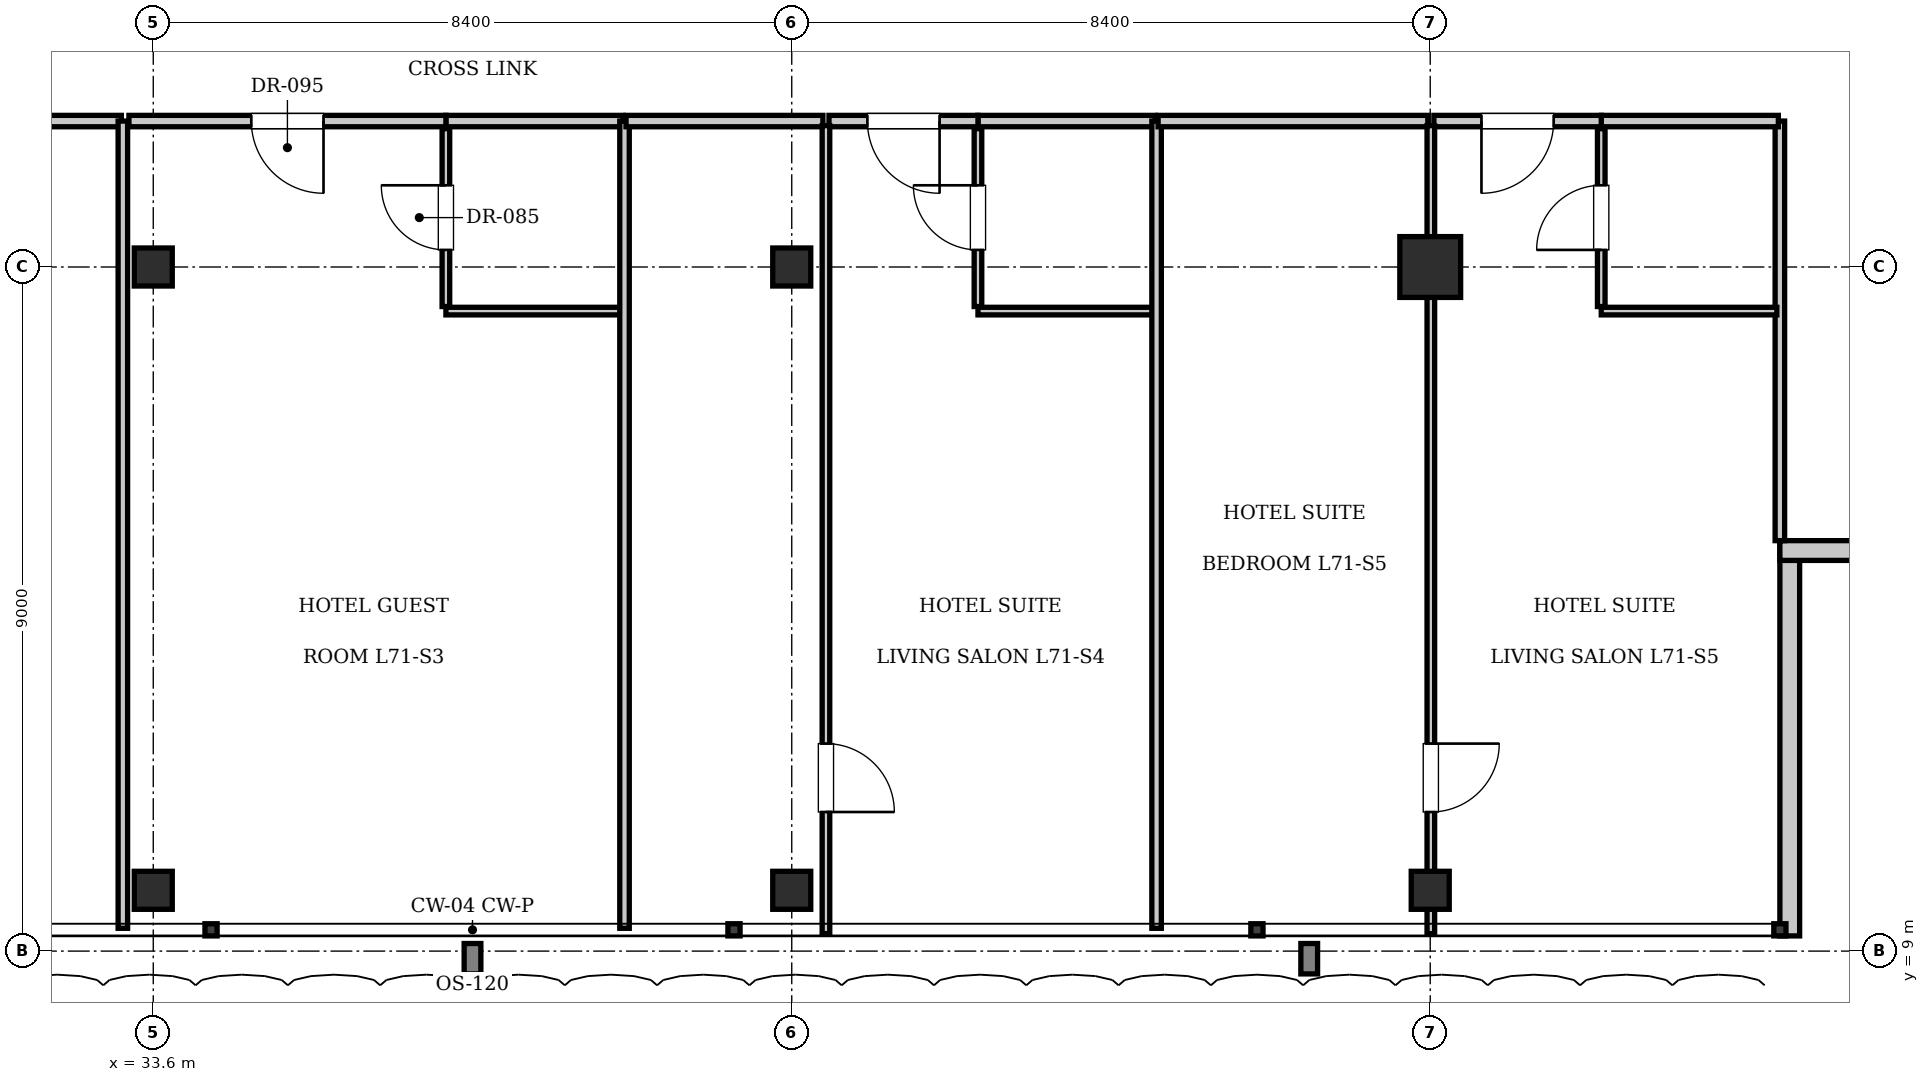
"""IFC4 building model, lengths in metres.
Left out: names, types, materials, properties, quantities, classifications, styles, units other than length and angle.
Written with IfcOpenShell. Run it as: python <this file> out.ifc"""

import sys

from ifc_helpers import new_model, si_unit, direction, frame, frame_2d, origin, origin_2d, place, context, subcontext, project, spatial, rectangle, i_section, extrude, element, fill, save


model = new_model("IFC4")
c1 = context("Model", 3, precision=1e-05, world=origin(), true_north=direction((0.0, 1.0)))
c2 = subcontext(c1, "Body", "Model", "MODEL_VIEW")
j1 = project(units=[si_unit("LENGTHUNIT", "METRE"), si_unit("PLANEANGLEUNIT", "RADIAN")], contexts=[c1])
p1 = place(None, origin())
s1 = spatial("IfcSite", under=j1, at=p1, CompositionType="ELEMENT")
p2 = place(p1, origin())
s2 = spatial("IfcBuilding", under=s1, at=p2, CompositionType="ELEMENT")
p3 = place(p2, frame((0.0, 0.0, 289.45)))
s3 = spatial("IfcBuildingStorey", under=s2, at=p3, CompositionType="ELEMENT", Elevation=289.45)
p4 = place(p3, frame((50.4, 18.0, 0.0), z_axis=(0.0, 0.0, 1.0), x_axis=(1.0, 0.0, 0.0)))
e1 = element("IfcColumn", 1, at=p4, inside=s3, PredefinedType="COLUMN", context=c2, shape_type="SweptSolid", body=[
    extrude(rectangle(XDim=0.8, YDim=0.8, at=origin_2d()), origin(), (0.0, 0.0, 1.0), 3.85),
])
for number, where, z_axis, x_axis in (
    (2, (33.6, 18.0, 0.0), (0.0, 0.0, 1.0), (1.0, 0.0, 0.0)),
    (3, (42.0, 18.0, 0.0), (0.0, 0.0, 1.0), (1.0, 0.0, 0.0)),
    (4, (33.6, 9.8, 0.0), (0.0, 0.0, 1.0), (1.0, 0.0, 0.0)),
    (5, (42.0, 9.8, 0.0), (0.0, 0.0, 1.0), (1.0, 0.0, 0.0)),
    (6, (50.4, 9.8, 0.0), (0.0, 0.0, 1.0), (1.0, 0.0, 0.0)),
):
    element("IfcColumn", number, at=place(p3, frame(where, z_axis=z_axis, x_axis=x_axis)), inside=s3, PredefinedType="COLUMN", context=c2, shape_type="SweptSolid", body=[
        extrude(i_section(OverallWidth=0.5, OverallDepth=0.5, WebThickness=0.022, FlangeThickness=0.032, at=origin_2d()), origin(), (0.0, 0.0, 1.0), 3.85),
    ])
p5 = place(p3, frame((55.13, 14.4, 0.0), z_axis=(0.0, 0.0, 1.0), x_axis=(0.0, -1.0, 0.0)))
e7 = element("IfcWall", 7, at=p5, inside=s3, PredefinedType="SOLIDWALL", context=c2, shape_type="SweptSolid", body=[
    extrude(rectangle(XDim=5.2, YDim=0.26, at=frame_2d((2.6, 0.0))), origin(), (0.0, 0.0, 1.0), 3.61),
])
p6 = place(p3, frame((60.2, 14.27, 0.0), z_axis=(0.0, 0.0, 1.0), x_axis=(-1.0, 0.0, 0.0)))
e8 = element("IfcWall", 8, at=p6, inside=s3, PredefinedType="SOLIDWALL", context=c2, shape_type="SweptSolid", body=[
    extrude(rectangle(XDim=5.2, YDim=0.26, at=frame_2d((2.6, 0.0))), origin(), (0.0, 0.0, 1.0), 3.61),
])
p7 = place(p6, frame((1.6, 0.0, 0.9)))
e9 = element("IfcOpeningElement", 9, at=p7, cuts=e8, PredefinedType="OPENING", context=c2, shape_type="SweptSolid", body=[
    extrude(rectangle(XDim=2.0, YDim=2.2, at=frame_2d((1.0, 1.1))), frame((0.0, 0.14, 0.0), z_axis=(0.0, -1.0, 0.0), x_axis=(1.0, 0.0, 0.0)), (0.0, 0.0, 1.0), 0.28),
])
p8 = place(p3, frame((55.0, 14.4, 0.0), z_axis=(0.0, 0.0, 1.0), x_axis=(0.0, 1.0, 0.0)))
e10 = element("IfcWall", 10, at=p8, inside=s3, PredefinedType="PARTITIONING", context=c2, shape_type="SweptSolid", body=[
    extrude(rectangle(XDim=5.52, YDim=0.125, at=frame_2d((2.76, 0.0))), origin(), (0.0, 0.0, 1.0), 3.61),
])
p9 = place(p3, frame((29.1, 19.92, 0.0), z_axis=(0.0, 0.0, 1.0), x_axis=(1.0, 0.0, 0.0)))
e11 = element("IfcWall", 11, at=p9, inside=s3, PredefinedType="PARTITIONING", context=c2, shape_type="SweptSolid", body=[
    extrude(rectangle(XDim=4.08, YDim=0.15, at=frame_2d((2.04, 0.0))), origin(), (0.0, 0.0, 1.0), 3.61),
])
p10 = place(p9, frame((1.565, 0.0, 0.0)))
e12 = element("IfcOpeningElement", 12, at=p10, cuts=e11, PredefinedType="OPENING", context=c2, shape_type="SweptSolid", body=[
    extrude(rectangle(XDim=0.95, YDim=2.15, at=frame_2d((0.475, 1.075))), frame((0.0, 0.085, 0.0), z_axis=(0.0, -1.0, 0.0), x_axis=(1.0, 0.0, 0.0)), (0.0, 0.0, 1.0), 0.17),
])
p11 = place(p3, frame((33.2, 9.3, 0.0), z_axis=(0.0, 0.0, 1.0), x_axis=(0.0, 1.0, 0.0)))
e13 = element("IfcWall", 13, at=p11, inside=s3, PredefinedType="PARTITIONING", context=c2, shape_type="SweptSolid", body=[
    extrude(rectangle(XDim=10.62, YDim=0.125, at=frame_2d((5.31, 0.0))), origin(), (0.0, 0.0, 1.0), 3.61),
])
p12 = place(p3, frame((37.45, 19.92, 0.0), z_axis=(0.0, 0.0, 1.0), x_axis=(1.0, 0.0, 0.0)))
e14 = element("IfcWall", 14, at=p12, inside=s3, PredefinedType="PARTITIONING", context=c2, shape_type="SweptSolid", body=[
    extrude(rectangle(XDim=2.33, YDim=0.15, at=frame_2d((1.165, 0.0))), origin(), (0.0, 0.0, 1.0), 3.61),
])
p13 = place(p3, frame((37.45, 17.42, 0.0), z_axis=(0.0, 0.0, 1.0), x_axis=(1.0, 0.0, 0.0)))
e15 = element("IfcWall", 15, at=p13, inside=s3, PredefinedType="PARTITIONING", context=c2, shape_type="SweptSolid", body=[
    extrude(rectangle(XDim=2.31, YDim=0.1, at=frame_2d((1.155, 0.0))), origin(), (0.0, 0.0, 1.0), 3.61),
])
p14 = place(p3, frame((37.45, 17.48, 0.0), z_axis=(0.0, 0.0, 1.0), x_axis=(0.0, 1.0, 0.0)))
e16 = element("IfcWall", 16, at=p14, inside=s3, PredefinedType="PARTITIONING", context=c2, shape_type="SweptSolid", body=[
    extrude(rectangle(XDim=2.34, YDim=0.1, at=frame_2d((1.17, 0.0))), origin(), (0.0, 0.0, 1.0), 3.61),
])
p15 = place(p14, frame((0.745, 0.0, 0.0)))
e17 = element("IfcOpeningElement", 17, at=p15, cuts=e16, PredefinedType="OPENING", context=c2, shape_type="SweptSolid", body=[
    extrude(rectangle(XDim=0.85, YDim=2.1, at=frame_2d((0.425, 1.05))), frame((0.0, 0.06, 0.0), z_axis=(0.0, -1.0, 0.0), x_axis=(1.0, 0.0, 0.0)), (0.0, 0.0, 1.0), 0.12),
])
p16 = place(p3, frame((33.28, 19.92, 0.0), z_axis=(0.0, 0.0, 1.0), x_axis=(1.0, 0.0, 0.0)))
e18 = element("IfcWall", 18, at=p16, inside=s3, PredefinedType="PARTITIONING", context=c2, shape_type="SweptSolid", body=[
    extrude(rectangle(XDim=4.17, YDim=0.15, at=frame_2d((2.085, 0.0))), origin(), (0.0, 0.0, 1.0), 3.61),
])
p17 = place(p16, frame((1.61, 0.0, 0.0)))
e19 = element("IfcOpeningElement", 19, at=p17, cuts=e18, PredefinedType="OPENING", context=c2, shape_type="SweptSolid", body=[
    extrude(rectangle(XDim=0.95, YDim=2.15, at=frame_2d((0.475, 1.075))), frame((0.0, 0.085, 0.0), z_axis=(0.0, -1.0, 0.0), x_axis=(1.0, 0.0, 0.0)), (0.0, 0.0, 1.0), 0.17),
])
p18 = place(p3, frame((39.8, 9.3, 0.0), z_axis=(0.0, 0.0, 1.0), x_axis=(0.0, 1.0, 0.0)))
e20 = element("IfcWall", 20, at=p18, inside=s3, PredefinedType="PARTITIONING", context=c2, shape_type="SweptSolid", body=[
    extrude(rectangle(XDim=10.62, YDim=0.125, at=frame_2d((5.31, 0.0))), origin(), (0.0, 0.0, 1.0), 3.61),
])
p19 = place(p3, frame((44.45, 19.92, 0.0), z_axis=(0.0, 0.0, 1.0), x_axis=(1.0, 0.0, 0.0)))
e21 = element("IfcWall", 21, at=p19, inside=s3, PredefinedType="PARTITIONING", context=c2, shape_type="SweptSolid", body=[
    extrude(rectangle(XDim=2.33, YDim=0.15, at=frame_2d((1.165, 0.0))), origin(), (0.0, 0.0, 1.0), 3.61),
])
p20 = place(p3, frame((44.45, 17.42, 0.0), z_axis=(0.0, 0.0, 1.0), x_axis=(1.0, 0.0, 0.0)))
e22 = element("IfcWall", 22, at=p20, inside=s3, PredefinedType="PARTITIONING", context=c2, shape_type="SweptSolid", body=[
    extrude(rectangle(XDim=2.31, YDim=0.1, at=frame_2d((1.155, 0.0))), origin(), (0.0, 0.0, 1.0), 3.61),
])
p21 = place(p3, frame((44.45, 17.48, 0.0), z_axis=(0.0, 0.0, 1.0), x_axis=(0.0, 1.0, 0.0)))
e23 = element("IfcWall", 23, at=p21, inside=s3, PredefinedType="PARTITIONING", context=c2, shape_type="SweptSolid", body=[
    extrude(rectangle(XDim=2.34, YDim=0.1, at=frame_2d((1.17, 0.0))), origin(), (0.0, 0.0, 1.0), 3.61),
])
p22 = place(p21, frame((0.745, 0.0, 0.0)))
e24 = element("IfcOpeningElement", 24, at=p22, cuts=e23, PredefinedType="OPENING", context=c2, shape_type="SweptSolid", body=[
    extrude(rectangle(XDim=0.85, YDim=2.1, at=frame_2d((0.425, 1.05))), frame((0.0, 0.06, 0.0), z_axis=(0.0, -1.0, 0.0), x_axis=(1.0, 0.0, 0.0)), (0.0, 0.0, 1.0), 0.12),
])
p23 = place(p3, frame((39.82, 19.92, 0.0), z_axis=(0.0, 0.0, 1.0), x_axis=(1.0, 0.0, 0.0)))
e25 = element("IfcWall", 25, at=p23, inside=s3, PredefinedType="PARTITIONING", context=c2, shape_type="SweptSolid", body=[
    extrude(rectangle(XDim=2.59, YDim=0.15, at=frame_2d((1.295, 0.0))), origin(), (0.0, 0.0, 1.0), 3.61),
])
p24 = place(p3, frame((42.49, 19.92, 0.0), z_axis=(0.0, 0.0, 1.0), x_axis=(1.0, 0.0, 0.0)))
e26 = element("IfcWall", 26, at=p24, inside=s3, PredefinedType="PARTITIONING", context=c2, shape_type="SweptSolid", body=[
    extrude(rectangle(XDim=1.96, YDim=0.15, at=frame_2d((0.98, 0.0))), origin(), (0.0, 0.0, 1.0), 3.61),
])
p25 = place(p24, frame((0.505, 0.0, 0.0)))
e27 = element("IfcOpeningElement", 27, at=p25, cuts=e26, PredefinedType="OPENING", context=c2, shape_type="SweptSolid", body=[
    extrude(rectangle(XDim=0.95, YDim=2.15, at=frame_2d((0.475, 1.075))), frame((0.0, 0.085, 0.0), z_axis=(0.0, -1.0, 0.0), x_axis=(1.0, 0.0, 0.0)), (0.0, 0.0, 1.0), 0.17),
])
p26 = place(p3, frame((42.45, 9.23, 0.0), z_axis=(0.0, 0.0, 1.0), x_axis=(0.0, 1.0, 0.0)))
e28 = element("IfcWall", 28, at=p26, inside=s3, PredefinedType="PARTITIONING", context=c2, shape_type="SweptSolid", body=[
    extrude(rectangle(XDim=10.63, YDim=0.1, at=frame_2d((5.315, 0.0))), origin(), (0.0, 0.0, 1.0), 3.61),
])
p27 = place(p26, frame((1.6, 0.0, 0.0)))
e29 = element("IfcOpeningElement", 29, at=p27, cuts=e28, PredefinedType="OPENING", context=c2, shape_type="SweptSolid", body=[
    extrude(rectangle(XDim=0.9, YDim=2.1, at=frame_2d((0.45, 1.05))), frame((0.0, 0.06, 0.0), z_axis=(0.0, -1.0, 0.0), x_axis=(1.0, 0.0, 0.0)), (0.0, 0.0, 1.0), 0.12),
])
p28 = place(p3, frame((46.8, 9.3, 0.0), z_axis=(0.0, 0.0, 1.0), x_axis=(0.0, 1.0, 0.0)))
e30 = element("IfcWall", 30, at=p28, inside=s3, PredefinedType="PARTITIONING", context=c2, shape_type="SweptSolid", body=[
    extrude(rectangle(XDim=10.62, YDim=0.125, at=frame_2d((5.31, 0.0))), origin(), (0.0, 0.0, 1.0), 3.61),
])
p29 = place(p3, frame((52.65, 19.92, 0.0), z_axis=(0.0, 0.0, 1.0), x_axis=(1.0, 0.0, 0.0)))
e31 = element("IfcWall", 31, at=p29, inside=s3, PredefinedType="PARTITIONING", context=c2, shape_type="SweptSolid", body=[
    extrude(rectangle(XDim=2.33, YDim=0.15, at=frame_2d((1.165, 0.0))), origin(), (0.0, 0.0, 1.0), 3.61),
])
p30 = place(p3, frame((52.65, 17.42, 0.0), z_axis=(0.0, 0.0, 1.0), x_axis=(1.0, 0.0, 0.0)))
e32 = element("IfcWall", 32, at=p30, inside=s3, PredefinedType="PARTITIONING", context=c2, shape_type="SweptSolid", body=[
    extrude(rectangle(XDim=2.31, YDim=0.1, at=frame_2d((1.155, 0.0))), origin(), (0.0, 0.0, 1.0), 3.61),
])
p31 = place(p3, frame((52.65, 17.48, 0.0), z_axis=(0.0, 0.0, 1.0), x_axis=(0.0, 1.0, 0.0)))
e33 = element("IfcWall", 33, at=p31, inside=s3, PredefinedType="PARTITIONING", context=c2, shape_type="SweptSolid", body=[
    extrude(rectangle(XDim=2.34, YDim=0.1, at=frame_2d((1.17, 0.0))), origin(), (0.0, 0.0, 1.0), 3.61),
])
p32 = place(p31, frame((0.745, 0.0, 0.0)))
e34 = element("IfcOpeningElement", 34, at=p32, cuts=e33, PredefinedType="OPENING", context=c2, shape_type="SweptSolid", body=[
    extrude(rectangle(XDim=0.85, YDim=2.1, at=frame_2d((0.425, 1.05))), frame((0.0, 0.06, 0.0), z_axis=(0.0, -1.0, 0.0), x_axis=(1.0, 0.0, 0.0)), (0.0, 0.0, 1.0), 0.12),
])
p33 = place(p3, frame((46.82, 19.92, 0.0), z_axis=(0.0, 0.0, 1.0), x_axis=(1.0, 0.0, 0.0)))
e35 = element("IfcWall", 35, at=p33, inside=s3, PredefinedType="PARTITIONING", context=c2, shape_type="SweptSolid", body=[
    extrude(rectangle(XDim=3.548, YDim=0.15, at=frame_2d((1.774, 0.0))), origin(), (0.0, 0.0, 1.0), 3.61),
])
p34 = place(p3, frame((50.448, 19.92, 0.0), z_axis=(0.0, 0.0, 1.0), x_axis=(1.0, 0.0, 0.0)))
e36 = element("IfcWall", 36, at=p34, inside=s3, PredefinedType="PARTITIONING", context=c2, shape_type="SweptSolid", body=[
    extrude(rectangle(XDim=2.202, YDim=0.15, at=frame_2d((1.101, 0.0))), origin(), (0.0, 0.0, 1.0), 3.61),
])
p35 = place(p34, frame((0.626, 0.0, 0.0)))
e37 = element("IfcOpeningElement", 37, at=p35, cuts=e36, PredefinedType="OPENING", context=c2, shape_type="SweptSolid", body=[
    extrude(rectangle(XDim=0.95, YDim=2.15, at=frame_2d((0.475, 1.075))), frame((0.0, 0.085, 0.0), z_axis=(0.0, -1.0, 0.0), x_axis=(1.0, 0.0, 0.0)), (0.0, 0.0, 1.0), 0.17),
])
p36 = place(p3, frame((50.408, 9.23, 0.0), z_axis=(0.0, 0.0, 1.0), x_axis=(0.0, 1.0, 0.0)))
e38 = element("IfcWall", 38, at=p36, inside=s3, PredefinedType="PARTITIONING", context=c2, shape_type="SweptSolid", body=[
    extrude(rectangle(XDim=10.63, YDim=0.1, at=frame_2d((5.315, 0.0))), origin(), (0.0, 0.0, 1.0), 3.081),
])
p37 = place(p36, frame((1.6, 0.0, 0.0)))
e39 = element("IfcOpeningElement", 39, at=p37, cuts=e38, PredefinedType="OPENING", context=c2, shape_type="SweptSolid", body=[
    extrude(rectangle(XDim=0.9, YDim=2.1, at=frame_2d((0.45, 1.05))), frame((0.0, 0.06, 0.0), z_axis=(0.0, -1.0, 0.0), x_axis=(1.0, 0.0, 0.0)), (0.0, 0.0, 1.0), 0.12),
])
p38 = place(p15, origin())
e40 = element("IfcDoor", 40, at=p38, inside=s3, OperationType="SINGLE_SWING_RIGHT", PredefinedType="DOOR", context=c2, shape_type="SweptSolid", body=[
    extrude(rectangle(XDim=0.85, YDim=2.1, at=frame_2d((0.425, 1.05))), frame((0.0, 0.025, 0.0), z_axis=(0.0, -1.0, 0.0), x_axis=(1.0, 0.0, 0.0)), (0.0, 0.0, 1.0), 0.05),
])
fill(e17, e40)
p39 = place(p17, frame((0.95, 0.0, 0.0), z_axis=(0.0, 0.0, 1.0), x_axis=(-1.0, 0.0, 0.0)))
e41 = element("IfcDoor", 41, at=p39, inside=s3, OperationType="SINGLE_SWING_LEFT", PredefinedType="DOOR", context=c2, shape_type="SweptSolid", body=[
    extrude(rectangle(XDim=0.95, YDim=2.15, at=frame_2d((0.475, 1.075))), frame((0.0, 0.025, 0.0), z_axis=(0.0, -1.0, 0.0), x_axis=(1.0, 0.0, 0.0)), (0.0, 0.0, 1.0), 0.05),
])
fill(e19, e41)
p40 = place(p22, origin())
e42 = element("IfcDoor", 42, at=p40, inside=s3, OperationType="SINGLE_SWING_RIGHT", PredefinedType="DOOR", context=c2, shape_type="SweptSolid", body=[
    extrude(rectangle(XDim=0.85, YDim=2.1, at=frame_2d((0.425, 1.05))), frame((0.0, 0.025, 0.0), z_axis=(0.0, -1.0, 0.0), x_axis=(1.0, 0.0, 0.0)), (0.0, 0.0, 1.0), 0.05),
])
fill(e24, e42)
p41 = place(p25, frame((0.95, 0.0, 0.0), z_axis=(0.0, 0.0, 1.0), x_axis=(-1.0, 0.0, 0.0)))
e43 = element("IfcDoor", 43, at=p41, inside=s3, OperationType="SINGLE_SWING_LEFT", PredefinedType="DOOR", context=c2, shape_type="SweptSolid", body=[
    extrude(rectangle(XDim=0.95, YDim=2.15, at=frame_2d((0.475, 1.075))), frame((0.0, 0.025, 0.0), z_axis=(0.0, -1.0, 0.0), x_axis=(1.0, 0.0, 0.0)), (0.0, 0.0, 1.0), 0.05),
])
fill(e27, e43)
p42 = place(p27, frame((0.9, 0.0, 0.0), z_axis=(0.0, 0.0, 1.0), x_axis=(-1.0, 0.0, 0.0)))
e44 = element("IfcDoor", 44, at=p42, inside=s3, OperationType="SINGLE_SWING_RIGHT", PredefinedType="DOOR", context=c2, shape_type="SweptSolid", body=[
    extrude(rectangle(XDim=0.9, YDim=2.1, at=frame_2d((0.45, 1.05))), frame((0.0, 0.025, 0.0), z_axis=(0.0, -1.0, 0.0), x_axis=(1.0, 0.0, 0.0)), (0.0, 0.0, 1.0), 0.05),
])
fill(e29, e44)
p43 = place(p32, origin())
e45 = element("IfcDoor", 45, at=p43, inside=s3, OperationType="SINGLE_SWING_LEFT", PredefinedType="DOOR", context=c2, shape_type="SweptSolid", body=[
    extrude(rectangle(XDim=0.85, YDim=2.1, at=frame_2d((0.425, 1.05))), frame((0.0, 0.025, 0.0), z_axis=(0.0, -1.0, 0.0), x_axis=(1.0, 0.0, 0.0)), (0.0, 0.0, 1.0), 0.05),
])
fill(e34, e45)
p44 = place(p35, frame((0.95, 0.0, 0.0), z_axis=(0.0, 0.0, 1.0), x_axis=(-1.0, 0.0, 0.0)))
e46 = element("IfcDoor", 46, at=p44, inside=s3, OperationType="SINGLE_SWING_RIGHT", PredefinedType="DOOR", context=c2, shape_type="SweptSolid", body=[
    extrude(rectangle(XDim=0.95, YDim=2.15, at=frame_2d((0.475, 1.075))), frame((0.0, 0.025, 0.0), z_axis=(0.0, -1.0, 0.0), x_axis=(1.0, 0.0, 0.0)), (0.0, 0.0, 1.0), 0.05),
])
fill(e37, e46)
p45 = place(p37, frame((0.9, 0.0, 0.0), z_axis=(0.0, 0.0, 1.0), x_axis=(-1.0, 0.0, 0.0)))
e47 = element("IfcDoor", 47, at=p45, inside=s3, OperationType="SINGLE_SWING_LEFT", PredefinedType="DOOR", context=c2, shape_type="SweptSolid", body=[
    extrude(rectangle(XDim=0.9, YDim=2.1, at=frame_2d((0.45, 1.05))), frame((0.0, 0.025, 0.0), z_axis=(0.0, -1.0, 0.0), x_axis=(1.0, 0.0, 0.0)), (0.0, 0.0, 1.0), 0.05),
])
fill(e39, e47)
save(model, sys.argv[1])
